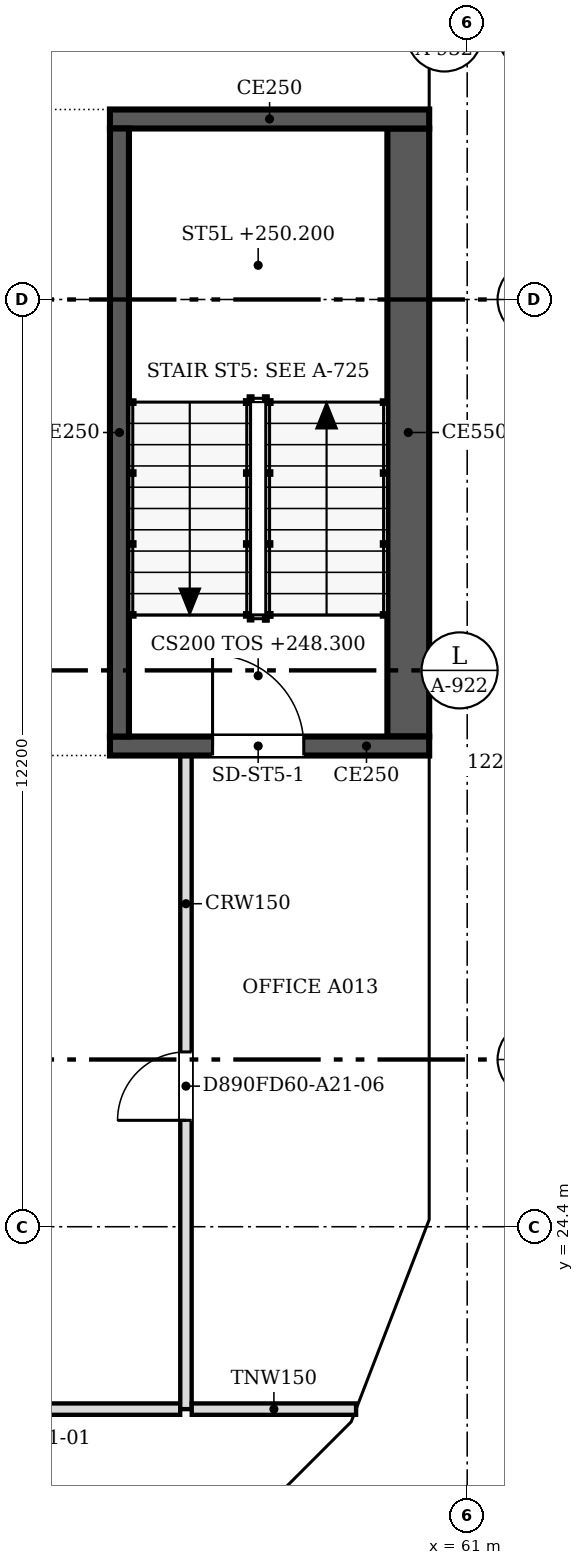
"""IFC4 building model, lengths in metres.
Left out: names, types, materials, properties, quantities, classifications, styles, units other than length and angle.
Written with IfcOpenShell. Run it as: python <this file> out.ifc"""

import sys

from ifc_helpers import new_model, si_unit, direction, frame, frame_2d, origin, place, context, subcontext, project, spatial, polyline, rectangle, outline, extrude, faceted_brep, source, transform, mapped, element, fill, save


model = new_model("IFC4")
c1 = context("Model", 3, precision=1e-05, world=origin(), true_north=direction((0.0, 1.0)))
c2 = subcontext(c1, "Body", "Model", "MODEL_VIEW")
j1 = project(units=[si_unit("LENGTHUNIT", "METRE"), si_unit("PLANEANGLEUNIT", "RADIAN")], contexts=[c1])
p1 = place(None, origin())
s1 = spatial("IfcSite", under=j1, at=p1, CompositionType="ELEMENT")
p2 = place(p1, origin())
s2 = spatial("IfcBuilding", under=s1, at=p2, CompositionType="ELEMENT")
p3 = place(p2, frame((0.0, 0.0, 248.3)))
s3 = spatial("IfcBuildingStorey", under=s2, at=p3, CompositionType="ELEMENT", Elevation=248.3)
m1 = source(origin(), c2, "Body", "Brep", [
    faceted_brep([(0.053, -0.25, 0.0), (2.997, -0.25, 3.8), (0.053, -0.25, 7.6), (0.0, -0.25, 7.532), (0.0, -0.25, 0.068), (0.106, 0.25, 7.532), (2.944, 0.25, 3.868), (2.944, 0.25, 3.732), (0.106, 0.25, 0.068), (2.997, 0.0, 3.8), (0.053, 0.0, 0.0), (0.053, 0.0, 7.6)], [[[0, 1, 2, 3, 4]], [[5, 6, 7, 8]], [[8, 7, 9, 1, 0, 10]], [[6, 5, 11, 2, 1, 9]], [[3, 2, 11]], [[10, 0, 4]], [[8, 10, 4, 3, 11, 5]], [[9, 7, 6]]]),
])
p4 = place(p3, frame((57.569, 19.574, -3.8), z_axis=(0.0, 0.0, 1.0), x_axis=(0.707106781187, 0.707106781187, 0.0)))
e1 = element("IfcWall", 1, at=p4, inside=s3, PredefinedType="SOLIDWALL", context=c2, shape_type="MappedRepresentation", body=[
    mapped(m1, transform((0.0, 0.0, 0.0), scale=1.0)),
])
m2 = source(origin(), c2, "Body", "SweptSolid", [
    extrude(outline(polyline([(0.253, 0.666), (2.681, 3.8), (0.253, 6.934), (0.253, 0.666)])), frame((0.0, 0.26, 0.0), z_axis=(0.0, -1.0, 0.0), x_axis=(1.0, 0.0, 0.0)), (0.0, 0.0, 1.0), 0.52),
])
p5 = place(p4, origin())
e2 = element("IfcOpeningElement", 2, at=p5, cuts=e1, PredefinedType="OPENING", context=c2, shape_type="MappedRepresentation", body=[
    mapped(m2, transform((0.0, 0.0, 0.0), scale=1.0)),
])
m3 = source(origin(), c2, "Body", "Brep", [
    faceted_brep([(2.95, -0.25, 0.0), (2.997, -0.25, 0.059), (2.997, -0.25, 7.541), (2.95, -0.25, 7.6), (0.0, -0.25, 3.8), (0.053, 0.25, 3.868), (2.904, 0.25, 7.54), (2.904, 0.25, 0.06), (0.053, 0.25, 3.732), (2.95, 0.0, 0.0), (2.95, 0.0, 7.6), (0.0, 0.0, 3.8)], [[[0, 1, 2, 3, 4]], [[5, 6, 7, 8]], [[1, 0, 9]], [[10, 3, 2]], [[6, 5, 11, 4, 3, 10]], [[8, 7, 9, 0, 4, 11]], [[8, 11, 5]], [[1, 9, 7, 6, 10, 2]]]),
])
p6 = place(p3, frame((59.688, 21.694, -3.8), z_axis=(0.0, 0.0, 1.0), x_axis=(0.359972353723, 0.932962970624, 0.0)))
e3 = element("IfcWall", 3, at=p6, inside=s3, PredefinedType="SOLIDWALL", context=c2, shape_type="MappedRepresentation", body=[
    mapped(m3, transform((0.0, 0.0, 0.0), scale=1.0)),
])
m4 = source(origin(), c2, "Body", "SweptSolid", [
    extrude(outline(polyline([(2.75, 6.935), (0.316, 3.8), (2.75, 0.665), (2.75, 6.935)])), frame((0.0, 0.26, 0.0), z_axis=(0.0, -1.0, 0.0), x_axis=(1.0, 0.0, 0.0)), (0.0, 0.0, 1.0), 0.52),
])
p7 = place(p6, origin())
e4 = element("IfcOpeningElement", 4, at=p7, cuts=e3, PredefinedType="OPENING", context=c2, shape_type="MappedRepresentation", body=[
    mapped(m4, transform((0.0, 0.0, 0.0), scale=1.0)),
])
m5 = source(origin(), c2, "Body", "Brep", [
    faceted_brep([(0.047, -0.25, 0.0), (3.05, -0.25, 3.8), (0.047, -0.25, 7.6), (0.0, -0.25, 7.54), (0.0, -0.25, 0.06), (0.093, 0.25, 7.541), (3.05, 0.25, 3.8), (0.093, 0.25, 0.059), (0.047, 0.0, 0.0), (0.047, 0.0, 7.6)], [[[0, 1, 2, 3, 4]], [[5, 6, 7]], [[7, 6, 1, 0, 8]], [[6, 5, 9, 2, 1]], [[3, 2, 9]], [[8, 0, 4]], [[7, 8, 4, 3, 9, 5]]]),
])
p8 = place(p3, frame((60.75, 24.4, -3.8), z_axis=(0.0, 0.0, 1.0), x_axis=(0.0, 1.0, 0.0)))
e5 = element("IfcWall", 5, at=p8, inside=s3, PredefinedType="SOLIDWALL", context=c2, shape_type="MappedRepresentation", body=[
    mapped(m5, transform((0.0, 0.0, 0.0), scale=1.0)),
])
m6 = source(origin(), c2, "Body", "SweptSolid", [
    extrude(outline(polyline([(0.247, 0.656), (2.731, 3.8), (0.247, 6.944), (0.247, 0.656)])), frame((0.0, 0.26, 0.0), z_axis=(0.0, -1.0, 0.0), x_axis=(1.0, 0.0, 0.0)), (0.0, 0.0, 1.0), 0.52),
])
p9 = place(p8, origin())
e6 = element("IfcOpeningElement", 6, at=p9, cuts=e5, PredefinedType="OPENING", context=c2, shape_type="MappedRepresentation", body=[
    mapped(m6, transform((0.0, 0.0, 0.0), scale=1.0)),
])
m7 = source(origin(), c2, "Body", "SweptSolid", [
    extrude(outline(polyline([(3.05, 0.0), (6.1, 3.8), (3.05, 7.6), (0.0, 3.8), (3.05, 0.0)])), frame((0.0, 0.25, 0.0), z_axis=(0.0, -1.0, 0.0), x_axis=(1.0, 0.0, 0.0)), (0.0, 0.0, 1.0), 0.5),
])
p10 = place(p3, frame((60.75, 27.45, -3.8), z_axis=(0.0, 0.0, 1.0), x_axis=(0.0, 1.0, 0.0)))
e7 = element("IfcWall", 7, at=p10, inside=s3, PredefinedType="SOLIDWALL", context=c2, shape_type="MappedRepresentation", body=[
    mapped(m7, transform((0.0, 0.0, 0.0), scale=1.0)),
])
m8 = source(origin(), c2, "Body", "SweptSolid", [
    extrude(outline(polyline([(3.05, 0.399), (5.78, 3.8), (3.05, 7.201), (0.321, 3.8), (3.05, 0.399)])), frame((0.0, 0.26, 0.0), z_axis=(0.0, -1.0, 0.0), x_axis=(1.0, 0.0, 0.0)), (0.0, 0.0, 1.0), 0.52),
])
p11 = place(p10, origin())
e8 = element("IfcOpeningElement", 8, at=p11, cuts=e7, PredefinedType="OPENING", context=c2, shape_type="MappedRepresentation", body=[
    mapped(m8, transform((0.0, 0.0, 0.0), scale=1.0)),
])
m9 = source(origin(), c2, "Body", "Brep", [
    faceted_brep([(3.05, -0.25, 0.0), (6.1, -0.25, 3.8), (6.1, -0.25, 3.8), (3.05, -0.25, 7.6), (0.0, -0.25, 3.8), (0.0, 0.25, 3.8), (3.05, 0.25, 7.6), (6.1, 0.25, 3.8), (6.1, 0.25, 3.8), (3.05, 0.25, 0.0)], [[[0, 1, 2, 3, 4]], [[5, 6, 7, 8, 9]], [[9, 8, 1, 0]], [[7, 6, 3, 2]], [[6, 5, 4, 3]], [[5, 9, 0, 4]], [[1, 8, 7, 2]]]),
])
p12 = place(p3, frame((60.75, 33.55, -3.8), z_axis=(0.0, 0.0, 1.0), x_axis=(0.0, 1.0, 0.0)))
e9 = element("IfcWall", 9, at=p12, inside=s3, PredefinedType="SOLIDWALL", context=c2, shape_type="MappedRepresentation", body=[
    mapped(m9, transform((0.0, 0.0, 0.0), scale=1.0)),
])
p13 = place(p12, origin())
e10 = element("IfcOpeningElement", 10, at=p13, cuts=e9, PredefinedType="OPENING", context=c2, shape_type="MappedRepresentation", body=[
    mapped(m8, transform((0.0, 0.0, 0.0), scale=1.0)),
])
p14 = place(p3, frame((60.75, 39.65, -3.8), z_axis=(0.0, 0.0, 1.0), x_axis=(0.0, 1.0, 0.0)))
e11 = element("IfcWall", 11, at=p14, inside=s3, PredefinedType="SOLIDWALL", context=c2, shape_type="MappedRepresentation", body=[
    mapped(m7, transform((0.0, 0.0, 0.0), scale=1.0)),
])
p15 = place(p14, origin())
e12 = element("IfcOpeningElement", 12, at=p15, cuts=e11, PredefinedType="OPENING", context=c2, shape_type="MappedRepresentation", body=[
    mapped(m8, transform((0.0, 0.0, 0.0), scale=1.0)),
])
p16 = place(p2, frame((0.0, 0.0, 252.1)))
s4 = spatial("IfcBuildingStorey", under=s2, at=p16, CompositionType="ELEMENT", Elevation=252.1)
m10 = source(origin(), c2, "Body", "Brep", [
    faceted_brep([(2.944, -0.25, 0.0), (2.997, -0.25, 0.068), (2.997, -0.25, 7.532), (2.944, -0.25, 7.6), (0.0, -0.25, 3.8), (0.053, 0.25, 3.868), (2.891, 0.25, 7.532), (2.891, 0.25, 0.068), (0.053, 0.25, 3.732), (2.944, 0.0, 0.0), (2.944, 0.0, 7.6), (0.0, 0.0, 3.8)], [[[0, 1, 2, 3, 4]], [[5, 6, 7, 8]], [[1, 0, 9]], [[10, 3, 2]], [[6, 5, 11, 4, 3, 10]], [[8, 7, 9, 0, 4, 11]], [[8, 11, 5]], [[1, 9, 7, 6, 10, 2]]]),
])
p17 = place(p16, frame((57.606, 19.612, -3.8), z_axis=(0.0, 0.0, 1.0), x_axis=(0.707106781187, 0.707106781187, 0.0)))
e13 = element("IfcWall", 13, at=p17, inside=s4, PredefinedType="SOLIDWALL", context=c2, shape_type="MappedRepresentation", body=[
    mapped(m10, transform((0.0, 0.0, 0.0), scale=1.0)),
])
m11 = source(origin(), c2, "Body", "SweptSolid", [
    extrude(outline(polyline([(2.744, 6.934), (0.316, 3.8), (2.744, 0.666), (2.744, 6.934)])), frame((0.0, 0.26, 0.0), z_axis=(0.0, -1.0, 0.0), x_axis=(1.0, 0.0, 0.0)), (0.0, 0.0, 1.0), 0.52),
])
p18 = place(p17, origin())
e14 = element("IfcOpeningElement", 14, at=p18, cuts=e13, PredefinedType="OPENING", context=c2, shape_type="MappedRepresentation", body=[
    mapped(m11, transform((0.0, 0.0, 0.0), scale=1.0)),
])
m12 = source(origin(), c2, "Body", "Brep", [
    faceted_brep([(0.053, -0.25, 0.0), (3.003, -0.25, 3.8), (0.053, -0.25, 7.6), (0.0, -0.25, 7.531), (0.0, -0.25, 0.068), (0.106, 0.25, 7.532), (2.957, 0.25, 3.86), (2.957, 0.25, 3.74), (0.106, 0.25, 0.068), (3.003, 0.0, 3.8), (0.053, 0.0, 0.0), (0.053, 0.0, 7.6)], [[[0, 1, 2, 3, 4]], [[5, 6, 7, 8]], [[8, 7, 9, 1, 0, 10]], [[6, 5, 11, 2, 1, 9]], [[3, 2, 11]], [[10, 0, 4]], [[8, 10, 4, 3, 11, 5]], [[7, 6, 9]]]),
])
p19 = place(p16, frame((59.669, 21.644, -3.8), z_axis=(0.0, 0.0, 1.0), x_axis=(0.35992665181, 0.932980602862, 0.0)))
e15 = element("IfcWall", 15, at=p19, inside=s4, PredefinedType="SOLIDWALL", context=c2, shape_type="MappedRepresentation", body=[
    mapped(m12, transform((0.0, 0.0, 0.0), scale=1.0)),
])
m13 = source(origin(), c2, "Body", "SweptSolid", [
    extrude(outline(polyline([(0.253, 0.665), (2.687, 3.8), (0.253, 6.935), (0.253, 0.665)])), frame((0.0, 0.26, 0.0), z_axis=(0.0, -1.0, 0.0), x_axis=(1.0, 0.0, 0.0)), (0.0, 0.0, 1.0), 0.52),
])
p20 = place(p19, origin())
e16 = element("IfcOpeningElement", 16, at=p20, cuts=e15, PredefinedType="OPENING", context=c2, shape_type="MappedRepresentation", body=[
    mapped(m13, transform((0.0, 0.0, 0.0), scale=1.0)),
])
m14 = source(origin(), c2, "Body", "Brep", [
    faceted_brep([(3.003, -0.25, 0.0), (6.053, -0.25, 3.8), (3.003, -0.25, 7.6), (0.0, -0.25, 3.8), (0.047, 0.25, 3.859), (3.003, 0.25, 7.6), (6.053, 0.25, 3.8), (3.003, 0.25, 0.0), (0.047, 0.25, 3.741), (0.0, 0.0, 3.8)], [[[0, 1, 2, 3]], [[4, 5, 6, 7, 8]], [[7, 6, 1, 0]], [[6, 5, 2, 1]], [[5, 4, 9, 3, 2]], [[8, 7, 0, 3, 9]], [[8, 9, 4]]]),
])
p21 = place(p16, frame((60.75, 24.447, -3.8), z_axis=(0.0, 0.0, 1.0), x_axis=(0.0, 1.0, 0.0)))
e17 = element("IfcWall", 17, at=p21, inside=s4, PredefinedType="SOLIDWALL", context=c2, shape_type="MappedRepresentation", body=[
    mapped(m14, transform((0.0, 0.0, 0.0), scale=1.0)),
])
m15 = source(origin(), c2, "Body", "SweptSolid", [
    extrude(outline(polyline([(3.005, 0.401), (5.733, 3.8), (3.005, 7.199), (0.319, 3.8), (3.005, 0.401)])), frame((0.0, 0.26, 0.0), z_axis=(0.0, -1.0, 0.0), x_axis=(1.0, 0.0, 0.0)), (0.0, 0.0, 1.0), 0.52),
])
p22 = place(p21, origin())
e18 = element("IfcOpeningElement", 18, at=p22, cuts=e17, PredefinedType="OPENING", context=c2, shape_type="MappedRepresentation", body=[
    mapped(m15, transform((0.0, 0.0, 0.0), scale=1.0)),
])
m16 = source(origin(), c2, "Body", "SweptSolid", [
    extrude(outline(polyline([(3.05, 0.0), (6.1, 3.8), (3.05, 7.6), (0.0, 3.8), (3.05, 0.0)])), frame((0.0, 0.25, 0.0), z_axis=(0.0, -1.0, 0.0), x_axis=(1.0, 0.0, 0.0)), (0.0, 0.0, 1.0), 0.5),
])
p23 = place(p16, frame((60.75, 30.5, -3.8), z_axis=(0.0, 0.0, 1.0), x_axis=(0.0, 1.0, 0.0)))
e19 = element("IfcWall", 19, at=p23, inside=s4, PredefinedType="SOLIDWALL", context=c2, shape_type="MappedRepresentation", body=[
    mapped(m16, transform((0.0, 0.0, 0.0), scale=1.0)),
])
m17 = source(origin(), c2, "Body", "SweptSolid", [
    extrude(outline(polyline([(3.05, 0.399), (5.78, 3.8), (3.05, 7.2), (0.321, 3.8), (3.05, 0.399)])), frame((0.0, 0.26, 0.0), z_axis=(0.0, -1.0, 0.0), x_axis=(1.0, 0.0, 0.0)), (0.0, 0.0, 1.0), 0.52),
])
p24 = place(p23, origin())
e20 = element("IfcOpeningElement", 20, at=p24, cuts=e19, PredefinedType="OPENING", context=c2, shape_type="MappedRepresentation", body=[
    mapped(m17, transform((0.0, 0.0, 0.0), scale=1.0)),
])
m18 = source(origin(), c2, "Body", "Brep", [
    faceted_brep([(3.05, -0.25, 0.0), (6.1, -0.25, 3.8), (6.1, -0.25, 3.8), (3.05, -0.25, 7.6), (0.0, -0.25, 3.8), (0.0, 0.25, 3.8), (3.05, 0.25, 7.6), (6.1, 0.25, 3.8), (6.1, 0.25, 3.8), (3.05, 0.25, 0.0)], [[[0, 1, 2, 3, 4]], [[5, 6, 7, 8, 9]], [[9, 8, 1, 0]], [[7, 6, 3, 2]], [[6, 5, 4, 3]], [[5, 9, 0, 4]], [[1, 8, 7, 2]]]),
])
p25 = place(p16, frame((60.75, 36.6, -3.8), z_axis=(0.0, 0.0, 1.0), x_axis=(0.0, 1.0, 0.0)))
e21 = element("IfcWall", 21, at=p25, inside=s4, PredefinedType="SOLIDWALL", context=c2, shape_type="MappedRepresentation", body=[
    mapped(m18, transform((0.0, 0.0, 0.0), scale=1.0)),
])
p26 = place(p25, origin())
e22 = element("IfcOpeningElement", 22, at=p26, cuts=e21, PredefinedType="OPENING", context=c2, shape_type="MappedRepresentation", body=[
    mapped(m17, transform((0.0, 0.0, 0.0), scale=1.0)),
])
p27 = place(p3, frame((60.5, 30.725, 0.0), z_axis=(0.0, 0.0, 1.0), x_axis=(-1.0, 0.0, 0.0)))
e23 = element("IfcWall", 23, at=p27, inside=s3, PredefinedType="SOLIDWALL", context=c2, shape_type="SweptSolid", body=[
    extrude(rectangle(XDim=4.2, YDim=0.25, at=frame_2d((2.1, 0.0))), origin(), (0.0, 0.0, 1.0), 3.8),
])
m19 = source(origin(), c2, "Body", "SweptSolid", [
    extrude(rectangle(XDim=1.2, YDim=2.1, at=frame_2d((0.6, 1.05))), frame((0.0, 0.135, 0.0), z_axis=(0.0, -1.0, 0.0), x_axis=(1.0, 0.0, 0.0)), (0.0, 0.0, 1.0), 0.27),
])
p28 = place(p27, frame((1.65, 0.0, 0.0)))
e24 = element("IfcOpeningElement", 24, at=p28, cuts=e23, PredefinedType="OPENING", context=c2, shape_type="MappedRepresentation", body=[
    mapped(m19, transform((0.0, 0.0, 0.0), scale=1.0)),
])
p29 = place(p3, frame((56.425, 30.85, 0.0), z_axis=(0.0, 0.0, 1.0), x_axis=(0.0, 1.0, 0.0)))
e25 = element("IfcWall", 25, at=p29, inside=s3, PredefinedType="SOLIDWALL", context=c2, shape_type="SweptSolid", body=[
    extrude(rectangle(XDim=8.0, YDim=0.25, at=frame_2d((4.0, 0.0))), origin(), (0.0, 0.0, 1.0), 3.8),
])
p30 = place(p3, frame((56.3, 38.975, 0.0), z_axis=(0.0, 0.0, 1.0), x_axis=(1.0, 0.0, 0.0)))
e26 = element("IfcWall", 26, at=p30, inside=s3, PredefinedType="SOLIDWALL", context=c2, shape_type="SweptSolid", body=[
    extrude(rectangle(XDim=4.2, YDim=0.25, at=frame_2d((2.1, 0.0))), origin(), (0.0, 0.0, 1.0), 3.8),
])
p31 = place(p3, frame((60.225, 38.85, 0.0), z_axis=(0.0, 0.0, 1.0), x_axis=(0.0, -1.0, 0.0)))
e27 = element("IfcWall", 27, at=p31, inside=s3, PredefinedType="SOLIDWALL", context=c2, shape_type="SweptSolid", body=[
    extrude(rectangle(XDim=8.0, YDim=0.55, at=frame_2d((4.0, 0.0))), origin(), (0.0, 0.0, 1.0), 3.8),
])
p32 = place(p3, frame((57.224, 22.0, 0.0), z_axis=(0.0, 0.0, 1.0), x_axis=(-1.0, 0.0, 0.0)))
e28 = element("IfcWall", 28, at=p32, inside=s3, PredefinedType="PARTITIONING", context=c2, shape_type="SweptSolid", body=[
    extrude(rectangle(XDim=29.124, YDim=0.15, at=frame_2d((14.562, 0.0))), origin(), (0.0, 0.0, 1.0), 3.067),
])
m20 = source(origin(), c2, "Body", "SweptSolid", [
    extrude(rectangle(XDim=0.9, YDim=2.1, at=frame_2d((0.45, 1.05))), frame((0.0, 0.085, 0.0), z_axis=(0.0, -1.0, 0.0), x_axis=(1.0, 0.0, 0.0)), (0.0, 0.0, 1.0), 0.17),
])
p33 = place(p32, frame((1.923, 0.0, 0.0)))
e29 = element("IfcOpeningElement", 29, at=p33, cuts=e28, PredefinedType="OPENING", context=c2, shape_type="MappedRepresentation", body=[
    mapped(m20, transform((0.0, 0.0, 0.0), scale=1.0)),
])
p34 = place(p32, frame((22.624, 0.0, 0.0)))
e30 = element("IfcOpeningElement", 30, at=p34, cuts=e28, PredefinedType="OPENING", context=c2, shape_type="MappedRepresentation", body=[
    mapped(m20, transform((0.0, 0.0, 0.0), scale=1.0)),
])
p35 = place(p32, frame((10.424, 0.0, 0.0)))
e31 = element("IfcOpeningElement", 31, at=p35, cuts=e28, PredefinedType="OPENING", context=c2, shape_type="MappedRepresentation", body=[
    mapped(m20, transform((0.0, 0.0, 0.0), scale=1.0)),
])
p36 = place(p3, frame((57.3, 30.6, 0.0), z_axis=(0.0, 0.0, 1.0), x_axis=(0.0, -1.0, 0.0)))
e32 = element("IfcWall", 32, at=p36, inside=s3, PredefinedType="PARTITIONING", context=c2, shape_type="SweptSolid", body=[
    extrude(rectangle(XDim=8.6, YDim=0.15, at=frame_2d((4.3, 0.0))), origin(), (0.0, 0.0, 1.0), 3.067),
])
p37 = place(p36, frame((3.9, 0.0, 0.0)))
e33 = element("IfcOpeningElement", 33, at=p37, cuts=e32, PredefinedType="OPENING", context=c2, shape_type="MappedRepresentation", body=[
    mapped(m20, transform((0.0, 0.0, 0.0), scale=1.0)),
])
p38 = place(p3, frame((57.376, 22.0, 0.0), z_axis=(0.0, 0.0, 1.0), x_axis=(1.0, 0.0, 0.0)))
e34 = element("IfcWall", 34, at=p38, inside=s3, PredefinedType="PARTITIONING", context=c2, shape_type="SweptSolid", body=[
    extrude(rectangle(XDim=2.162, YDim=0.15, at=frame_2d((1.081, 0.0))), origin(), (0.0, 0.0, 1.0), 3.067),
])
m21 = source(origin(), c2, "Body", "SweptSolid", [
    extrude(rectangle(XDim=1.2, YDim=2.1, at=frame_2d((0.6, 1.05))), frame((0.0, 0.025, 0.0), z_axis=(0.0, -1.0, 0.0), x_axis=(1.0, 0.0, 0.0)), (0.0, 0.0, 1.0), 0.05),
])
p39 = place(p28, origin())
e35 = element("IfcDoor", 35, at=p39, inside=s3, OperationType="SINGLE_SWING_RIGHT", PredefinedType="DOOR", context=c2, shape_type="MappedRepresentation", body=[
    mapped(m21, transform((0.0, 0.0, 0.0), scale=1.0)),
])
fill(e24, e35)
m22 = source(origin(), c2, "Body", "SweptSolid", [
    extrude(rectangle(XDim=0.9, YDim=2.1, at=frame_2d((0.45, 1.05))), frame((0.0, 0.025, 0.0), z_axis=(0.0, -1.0, 0.0), x_axis=(1.0, 0.0, 0.0)), (0.0, 0.0, 1.0), 0.05),
])
p40 = place(p37, origin())
e36 = element("IfcDoor", 36, at=p40, inside=s3, OperationType="SINGLE_SWING_RIGHT", PredefinedType="DOOR", context=c2, shape_type="MappedRepresentation", body=[
    mapped(m22, transform((0.0, 0.0, 0.0), scale=1.0)),
])
fill(e33, e36)
save(model, sys.argv[1])
